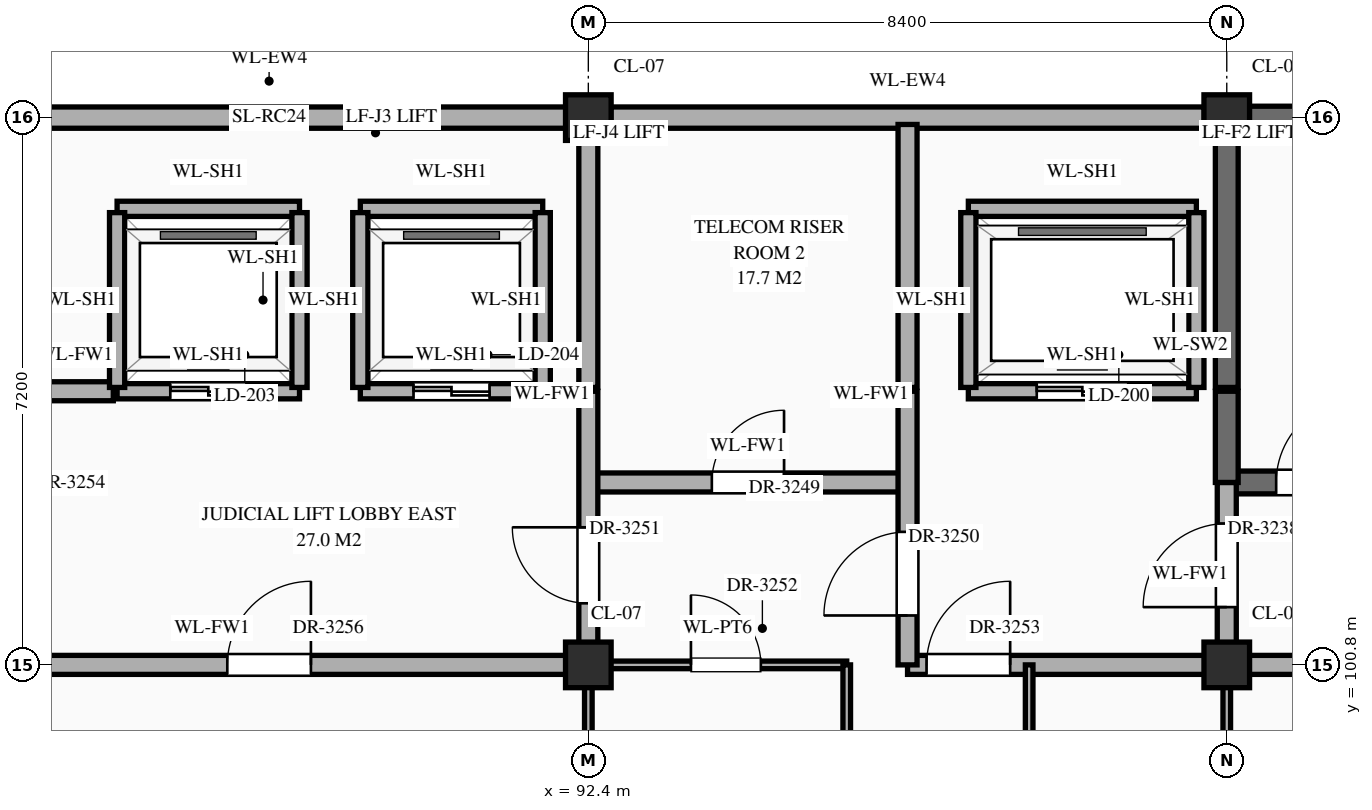
"""IFC4 building model, lengths in metres.
Left out: names, types, materials, properties, quantities, classifications, styles, units other than length and angle.
Written with IfcOpenShell. Run it as: python <this file> out.ifc"""

import sys

from ifc_helpers import new_model, si_unit, direction, frame, frame_2d, origin, origin_2d, place, context, subcontext, project, spatial, rectangle, extrude, element, fill, save


model = new_model("IFC4")
c1 = context("Model", 3, precision=1e-05, world=origin(), true_north=direction((0.0, 1.0)))
c2 = subcontext(c1, "Body", "Model", "MODEL_VIEW")
j1 = project(units=[si_unit("LENGTHUNIT", "METRE"), si_unit("PLANEANGLEUNIT", "RADIAN")], contexts=[c1])
p1 = place(None, origin())
s1 = spatial("IfcSite", under=j1, at=p1, CompositionType="ELEMENT")
p2 = place(p1, origin())
s2 = spatial("IfcBuilding", under=s1, at=p2, CompositionType="ELEMENT")
p3 = place(p2, frame((0.0, 0.0, 60.3)))
s3 = spatial("IfcBuildingStorey", under=s2, at=p3, CompositionType="ELEMENT", Elevation=60.3)
for number, where, z_axis, x_axis in (
    (1, (92.4, 100.8, 0.0), (0.0, 0.0, 1.0), (1.0, 0.0, 0.0)),
    (2, (92.4, 108.0, 0.0), (0.0, 0.0, 1.0), (1.0, 0.0, 0.0)),
    (3, (100.8, 100.8, 0.0), (0.0, 0.0, 1.0), (1.0, 0.0, 0.0)),
    (4, (100.8, 108.0, 0.0), (0.0, 0.0, 1.0), (1.0, 0.0, 0.0)),
):
    element("IfcColumn", number, at=place(p3, frame(where, z_axis=z_axis, x_axis=x_axis)), inside=s3, PredefinedType="COLUMN", context=c2, shape_type="SweptSolid", body=[
        extrude(rectangle(XDim=0.6, YDim=0.6, at=origin_2d()), origin(), (0.0, 0.0, 1.0), 4.2),
    ])
p4 = place(p3, frame((84.295, 108.0, 0.0), z_axis=(0.0, 0.0, 1.0), x_axis=(1.0, 0.0, 0.0)))
e5 = element("IfcWall", 5, at=p4, inside=s3, PredefinedType="STANDARD", context=c2, shape_type="SweptSolid", body=[
    extrude(rectangle(XDim=7.81, YDim=0.28, at=frame_2d((3.905, 0.0))), origin(), (0.0, 0.0, 1.0), 3.31),
])
p5 = place(p3, frame((92.695, 108.0, 0.0), z_axis=(0.0, 0.0, 1.0), x_axis=(1.0, 0.0, 0.0)))
e6 = element("IfcWall", 6, at=p5, inside=s3, PredefinedType="STANDARD", context=c2, shape_type="SweptSolid", body=[
    extrude(rectangle(XDim=7.81, YDim=0.28, at=frame_2d((3.905, 0.0))), origin(), (0.0, 0.0, 1.0), 3.31),
])
p6 = place(p3, frame((101.095, 108.0, 0.0), z_axis=(0.0, 0.0, 1.0), x_axis=(1.0, 0.0, 0.0)))
e7 = element("IfcWall", 7, at=p6, inside=s3, PredefinedType="SHEAR", context=c2, shape_type="SweptSolid", body=[
    extrude(rectangle(XDim=7.81, YDim=0.3, at=frame_2d((3.905, 0.0))), origin(), (0.0, 0.0, 1.0), 3.96),
])
p7 = place(p3, frame((75.6, 100.8, 0.0), z_axis=(0.0, 0.0, 1.0), x_axis=(1.0, 0.0, 0.0)))
e8 = element("IfcWall", 8, at=p7, inside=s3, PredefinedType="STANDARD", context=c2, shape_type="SweptSolid", body=[
    extrude(rectangle(XDim=16.8, YDim=0.25, at=frame_2d((8.4, 0.0))), origin(), (0.0, 0.0, 1.0), 3.11),
])
p8 = place(p7, frame((3.725, 0.0, 0.0)))
e9 = element("IfcOpeningElement", 9, at=p8, cuts=e8, PredefinedType="OPENING", context=c2, shape_type="SweptSolid", body=[
    extrude(rectangle(XDim=0.95, YDim=2.15, at=frame_2d((0.475, 1.075))), frame((0.0, 0.137, 0.0), z_axis=(0.0, -1.0, 0.0), x_axis=(1.0, 0.0, 0.0)), (0.0, 0.0, 1.0), 0.274),
])
p9 = place(p7, frame((12.05, 0.0, 0.0)))
e10 = element("IfcOpeningElement", 10, at=p9, cuts=e8, PredefinedType="OPENING", context=c2, shape_type="SweptSolid", body=[
    extrude(rectangle(XDim=1.1, YDim=2.2, at=frame_2d((0.55, 1.1))), frame((0.0, 0.137, 0.0), z_axis=(0.0, -1.0, 0.0), x_axis=(1.0, 0.0, 0.0)), (0.0, 0.0, 1.0), 0.274),
])
p10 = place(p3, frame((92.4, 100.8, 0.0), z_axis=(0.0, 0.0, 1.0), x_axis=(1.0, 0.0, 0.0)))
e11 = element("IfcWall", 11, at=p10, inside=s3, PredefinedType="STANDARD", context=c2, shape_type="SweptSolid", body=[
    extrude(rectangle(XDim=3.4, YDim=0.1, at=frame_2d((1.7, 0.0))), origin(), (0.0, 0.0, 1.0), 3.11),
])
p11 = place(p10, frame((1.35, 0.0, 0.0)))
e12 = element("IfcOpeningElement", 12, at=p11, cuts=e11, PredefinedType="OPENING", context=c2, shape_type="SweptSolid", body=[
    extrude(rectangle(XDim=0.92, YDim=2.15, at=frame_2d((0.46, 1.075))), frame((0.0, 0.062, 0.0), z_axis=(0.0, -1.0, 0.0), x_axis=(1.0, 0.0, 0.0)), (0.0, 0.0, 1.0), 0.124),
])
p12 = place(p3, frame((96.6, 100.8, 0.0), z_axis=(0.0, 0.0, 1.0), x_axis=(1.0, 0.0, 0.0)))
e13 = element("IfcWall", 13, at=p12, inside=s3, PredefinedType="STANDARD", context=c2, shape_type="SweptSolid", body=[
    extrude(rectangle(XDim=12.56, YDim=0.25, at=frame_2d((6.28, 0.0))), origin(), (0.0, 0.0, 1.0), 3.11),
])
p13 = place(p12, frame((7.9, 0.0, 0.0)))
e14 = element("IfcOpeningElement", 14, at=p13, cuts=e13, PredefinedType="OPENING", context=c2, shape_type="SweptSolid", body=[
    extrude(rectangle(XDim=1.0, YDim=2.2, at=frame_2d((0.5, 1.1))), frame((0.0, 0.137, 0.0), z_axis=(0.0, -1.0, 0.0), x_axis=(1.0, 0.0, 0.0)), (0.0, 0.0, 1.0), 0.274),
])
p14 = place(p12, frame((0.25, 0.0, 0.0)))
e15 = element("IfcOpeningElement", 15, at=p14, cuts=e13, PredefinedType="OPENING", context=c2, shape_type="SweptSolid", body=[
    extrude(rectangle(XDim=1.1, YDim=2.2, at=frame_2d((0.55, 1.1))), frame((0.0, 0.137, 0.0), z_axis=(0.0, -1.0, 0.0), x_axis=(1.0, 0.0, 0.0)), (0.0, 0.0, 1.0), 0.274),
])
p15 = place(p3, frame((92.4, 103.2, 0.0), z_axis=(0.0, 0.0, 1.0), x_axis=(1.0, 0.0, 0.0)))
e16 = element("IfcWall", 16, at=p15, inside=s3, PredefinedType="STANDARD", context=c2, shape_type="SweptSolid", body=[
    extrude(rectangle(XDim=4.2, YDim=0.25, at=frame_2d((2.1, 0.0))), origin(), (0.0, 0.0, 1.0), 3.96),
])
p16 = place(p15, frame((1.625, 0.0, 0.0)))
e17 = element("IfcOpeningElement", 17, at=p16, cuts=e16, PredefinedType="OPENING", context=c2, shape_type="SweptSolid", body=[
    extrude(rectangle(XDim=0.95, YDim=2.15, at=frame_2d((0.475, 1.075))), frame((0.0, 0.137, 0.0), z_axis=(0.0, -1.0, 0.0), x_axis=(1.0, 0.0, 0.0)), (0.0, 0.0, 1.0), 0.274),
])
p17 = place(p3, frame((100.8, 103.2, 0.0), z_axis=(0.0, 0.0, 1.0), x_axis=(1.0, 0.0, 0.0)))
e18 = element("IfcWall", 18, at=p17, inside=s3, PredefinedType="SHEAR", context=c2, shape_type="SweptSolid", body=[
    extrude(rectangle(XDim=8.36, YDim=0.3, at=frame_2d((4.18, 0.0))), origin(), (0.0, 0.0, 1.0), 3.96),
])
p18 = place(p17, frame((0.65, 0.0, 0.0)))
e19 = element("IfcOpeningElement", 19, at=p18, cuts=e18, PredefinedType="OPENING", context=c2, shape_type="SweptSolid", body=[
    extrude(rectangle(XDim=1.1, YDim=2.2, at=frame_2d((0.55, 1.1))), frame((0.0, 0.162, 0.0), z_axis=(0.0, -1.0, 0.0), x_axis=(1.0, 0.0, 0.0)), (0.0, 0.0, 1.0), 0.324),
])
p19 = place(p3, frame((84.05, 104.4, 0.0), z_axis=(0.0, 0.0, 1.0), x_axis=(1.0, 0.0, 0.0)))
e20 = element("IfcWall", 20, at=p19, inside=s3, PredefinedType="STANDARD", context=c2, shape_type="SweptSolid", body=[
    extrude(rectangle(XDim=2.1, YDim=0.25, at=frame_2d((1.05, 0.0))), origin(), (0.0, 0.0, 1.0), 3.96),
])
p20 = place(p3, frame((86.2, 104.4, 0.0), z_axis=(0.0, 0.0, 1.0), x_axis=(1.0, 0.0, 0.0)))
e21 = element("IfcWall", 21, at=p20, inside=s3, PredefinedType="STANDARD", context=c2, shape_type="SweptSolid", body=[
    extrude(rectangle(XDim=2.4, YDim=0.2, at=frame_2d((1.2, 0.0))), origin(), (0.0, 0.0, 1.0), 3.96),
])
p21 = place(p20, frame((0.7, 0.0, 0.0)))
e22 = element("IfcOpeningElement", 22, at=p21, cuts=e21, PredefinedType="OPENING", context=c2, shape_type="SweptSolid", body=[
    extrude(rectangle(XDim=1.0, YDim=2.15, at=frame_2d((0.5, 1.075))), frame((0.0, 0.112, 0.0), z_axis=(0.0, -1.0, 0.0), x_axis=(1.0, 0.0, 0.0)), (0.0, 0.0, 1.0), 0.224),
])
p22 = place(p3, frame((89.4, 104.4, 0.0), z_axis=(0.0, 0.0, 1.0), x_axis=(1.0, 0.0, 0.0)))
e23 = element("IfcWall", 23, at=p22, inside=s3, PredefinedType="STANDARD", context=c2, shape_type="SweptSolid", body=[
    extrude(rectangle(XDim=2.4, YDim=0.2, at=frame_2d((1.2, 0.0))), origin(), (0.0, 0.0, 1.0), 3.96),
])
p23 = place(p22, frame((0.7, 0.0, 0.0)))
e24 = element("IfcOpeningElement", 24, at=p23, cuts=e23, PredefinedType="OPENING", context=c2, shape_type="SweptSolid", body=[
    extrude(rectangle(XDim=1.0, YDim=2.15, at=frame_2d((0.5, 1.075))), frame((0.0, 0.112, 0.0), z_axis=(0.0, -1.0, 0.0), x_axis=(1.0, 0.0, 0.0)), (0.0, 0.0, 1.0), 0.224),
])
p24 = place(p3, frame((97.4, 104.4, 0.0), z_axis=(0.0, 0.0, 1.0), x_axis=(1.0, 0.0, 0.0)))
e25 = element("IfcWall", 25, at=p24, inside=s3, PredefinedType="STANDARD", context=c2, shape_type="SweptSolid", body=[
    extrude(rectangle(XDim=3.0, YDim=0.2, at=frame_2d((1.5, 0.0))), origin(), (0.0, 0.0, 1.0), 3.96),
])
p25 = place(p24, frame((0.9, 0.0, 0.0)))
e26 = element("IfcOpeningElement", 26, at=p25, cuts=e25, PredefinedType="OPENING", context=c2, shape_type="SweptSolid", body=[
    extrude(rectangle(XDim=1.2, YDim=2.15, at=frame_2d((0.6, 1.075))), frame((0.0, 0.112, 0.0), z_axis=(0.0, -1.0, 0.0), x_axis=(1.0, 0.0, 0.0)), (0.0, 0.0, 1.0), 0.224),
])
for number, where, z_axis, x_axis in (
    (27, (86.2, 106.8, 0.0), (0.0, 0.0, 1.0), (1.0, 0.0, 0.0)),
    (28, (89.4, 106.8, 0.0), (0.0, 0.0, 1.0), (1.0, 0.0, 0.0)),
):
    element("IfcWall", number, at=place(p3, frame(where, z_axis=z_axis, x_axis=x_axis)), inside=s3, PredefinedType="STANDARD", context=c2, shape_type="SweptSolid", body=[
        extrude(rectangle(XDim=2.4, YDim=0.2, at=frame_2d((1.2, 0.0))), origin(), (0.0, 0.0, 1.0), 3.96),
    ])
p26 = place(p3, frame((97.4, 106.8, 0.0), z_axis=(0.0, 0.0, 1.0), x_axis=(1.0, 0.0, 0.0)))
e29 = element("IfcWall", 29, at=p26, inside=s3, PredefinedType="STANDARD", context=c2, shape_type="SweptSolid", body=[
    extrude(rectangle(XDim=3.0, YDim=0.2, at=frame_2d((1.5, 0.0))), origin(), (0.0, 0.0, 1.0), 3.96),
])
for number, where, z_axis, x_axis in (
    (30, (86.2, 104.45, 0.0), (0.0, 0.0, 1.0), (0.0, 1.0, 0.0)),
    (31, (88.6, 104.45, 0.0), (0.0, 0.0, 1.0), (0.0, 1.0, 0.0)),
    (32, (89.4, 104.45, 0.0), (0.0, 0.0, 1.0), (0.0, 1.0, 0.0)),
    (33, (91.8, 104.45, 0.0), (0.0, 0.0, 1.0), (0.0, 1.0, 0.0)),
):
    element("IfcWall", number, at=place(p3, frame(where, z_axis=z_axis, x_axis=x_axis)), inside=s3, PredefinedType="STANDARD", context=c2, shape_type="SweptSolid", body=[
        extrude(rectangle(XDim=2.3, YDim=0.2, at=frame_2d((1.15, 0.0))), origin(), (0.0, 0.0, 1.0), 3.96),
    ])
p27 = place(p3, frame((92.4, 95.35, 0.0), z_axis=(0.0, 0.0, 1.0), x_axis=(0.0, 1.0, 0.0)))
e34 = element("IfcWall", 34, at=p27, inside=s3, PredefinedType="STANDARD", context=c2, shape_type="SweptSolid", body=[
    extrude(rectangle(XDim=5.45, YDim=0.1, at=frame_2d((2.725, 0.0))), origin(), (0.0, 0.0, 1.0), 3.21),
])
p28 = place(p3, frame((92.4, 100.8, 0.0), z_axis=(0.0, 0.0, 1.0), x_axis=(0.0, 1.0, 0.0)))
e35 = element("IfcWall", 35, at=p28, inside=s3, PredefinedType="STANDARD", context=c2, shape_type="SweptSolid", body=[
    extrude(rectangle(XDim=3.6, YDim=0.25, at=frame_2d((1.8, 0.0))), origin(), (0.0, 0.0, 1.0), 3.21),
])
p29 = place(p28, frame((0.81, 0.0, 0.0)))
e36 = element("IfcOpeningElement", 36, at=p29, cuts=e35, PredefinedType="OPENING", context=c2, shape_type="SweptSolid", body=[
    extrude(rectangle(XDim=1.0, YDim=2.2, at=frame_2d((0.5, 1.1))), frame((0.0, 0.137, 0.0), z_axis=(0.0, -1.0, 0.0), x_axis=(1.0, 0.0, 0.0)), (0.0, 0.0, 1.0), 0.274),
])
p30 = place(p3, frame((92.4, 104.45, 0.0), z_axis=(0.0, 0.0, 1.0), x_axis=(0.0, 1.0, 0.0)))
e37 = element("IfcWall", 37, at=p30, inside=s3, PredefinedType="STANDARD", context=c2, shape_type="SweptSolid", body=[
    extrude(rectangle(XDim=3.46, YDim=0.25, at=frame_2d((1.73, 0.0))), origin(), (0.0, 0.0, 1.0), 3.21),
])
p31 = place(p3, frame((95.8, 95.35, 0.0), z_axis=(0.0, 0.0, 1.0), x_axis=(0.0, 1.0, 0.0)))
e38 = element("IfcWall", 38, at=p31, inside=s3, PredefinedType="STANDARD", context=c2, shape_type="SweptSolid", body=[
    extrude(rectangle(XDim=5.45, YDim=0.1, at=frame_2d((2.725, 0.0))), origin(), (0.0, 0.0, 1.0), 3.96),
])
p32 = place(p31, frame((2.155, 0.0, 0.0)))
e39 = element("IfcOpeningElement", 39, at=p32, cuts=e38, PredefinedType="OPENING", context=c2, shape_type="SweptSolid", body=[
    extrude(rectangle(XDim=1.14, YDim=2.4, at=frame_2d((0.57, 1.2))), frame((0.0, 0.062, 0.0), z_axis=(0.0, -1.0, 0.0), x_axis=(1.0, 0.0, 0.0)), (0.0, 0.0, 1.0), 0.124),
])
p33 = place(p3, frame((96.6, 100.8, 0.0), z_axis=(0.0, 0.0, 1.0), x_axis=(0.0, 1.0, 0.0)))
e40 = element("IfcWall", 40, at=p33, inside=s3, PredefinedType="STANDARD", context=c2, shape_type="SweptSolid", body=[
    extrude(rectangle(XDim=3.6, YDim=0.25, at=frame_2d((1.8, 0.0))), origin(), (0.0, 0.0, 1.0), 3.96),
])
p34 = place(p33, frame((0.65, 0.0, 0.0)))
e41 = element("IfcOpeningElement", 41, at=p34, cuts=e40, PredefinedType="OPENING", context=c2, shape_type="SweptSolid", body=[
    extrude(rectangle(XDim=1.1, YDim=2.2, at=frame_2d((0.55, 1.1))), frame((0.0, 0.137, 0.0), z_axis=(0.0, -1.0, 0.0), x_axis=(1.0, 0.0, 0.0)), (0.0, 0.0, 1.0), 0.274),
])
p35 = place(p3, frame((96.6, 104.45, 0.0), z_axis=(0.0, 0.0, 1.0), x_axis=(0.0, 1.0, 0.0)))
e42 = element("IfcWall", 42, at=p35, inside=s3, PredefinedType="STANDARD", context=c2, shape_type="SweptSolid", body=[
    extrude(rectangle(XDim=3.46, YDim=0.25, at=frame_2d((1.73, 0.0))), origin(), (0.0, 0.0, 1.0), 3.96),
])
p36 = place(p3, frame((97.4, 104.45, 0.0), z_axis=(0.0, 0.0, 1.0), x_axis=(0.0, 1.0, 0.0)))
e43 = element("IfcWall", 43, at=p36, inside=s3, PredefinedType="STANDARD", context=c2, shape_type="SweptSolid", body=[
    extrude(rectangle(XDim=2.3, YDim=0.2, at=frame_2d((1.15, 0.0))), origin(), (0.0, 0.0, 1.0), 3.96),
])
p37 = place(p3, frame((98.2, 95.35, 0.0), z_axis=(0.0, 0.0, 1.0), x_axis=(0.0, 1.0, 0.0)))
e44 = element("IfcWall", 44, at=p37, inside=s3, PredefinedType="STANDARD", context=c2, shape_type="SweptSolid", body=[
    extrude(rectangle(XDim=5.45, YDim=0.1, at=frame_2d((2.725, 0.0))), origin(), (0.0, 0.0, 1.0), 3.96),
])
p38 = place(p37, frame((2.275, 0.0, 0.0)))
e45 = element("IfcOpeningElement", 45, at=p38, cuts=e44, PredefinedType="OPENING", context=c2, shape_type="SweptSolid", body=[
    extrude(rectangle(XDim=0.9, YDim=2.15, at=frame_2d((0.45, 1.075))), frame((0.0, 0.062, 0.0), z_axis=(0.0, -1.0, 0.0), x_axis=(1.0, 0.0, 0.0)), (0.0, 0.0, 1.0), 0.124),
])
p39 = place(p3, frame((100.4, 104.45, 0.0), z_axis=(0.0, 0.0, 1.0), x_axis=(0.0, 1.0, 0.0)))
e46 = element("IfcWall", 46, at=p39, inside=s3, PredefinedType="STANDARD", context=c2, shape_type="SweptSolid", body=[
    extrude(rectangle(XDim=2.3, YDim=0.2, at=frame_2d((1.15, 0.0))), origin(), (0.0, 0.0, 1.0), 3.96),
])
p40 = place(p3, frame((100.8, 95.35, 0.0), z_axis=(0.0, 0.0, 1.0), x_axis=(0.0, 1.0, 0.0)))
e47 = element("IfcWall", 47, at=p40, inside=s3, PredefinedType="STANDARD", context=c2, shape_type="SweptSolid", body=[
    extrude(rectangle(XDim=5.45, YDim=0.1, at=frame_2d((2.725, 0.0))), origin(), (0.0, 0.0, 1.0), 3.21),
])
p41 = place(p3, frame((100.8, 100.8, 0.0), z_axis=(0.0, 0.0, 1.0), x_axis=(0.0, 1.0, 0.0)))
e48 = element("IfcWall", 48, at=p41, inside=s3, PredefinedType="STANDARD", context=c2, shape_type="SweptSolid", body=[
    extrude(rectangle(XDim=2.4, YDim=0.25, at=frame_2d((1.2, 0.0))), origin(), (0.0, 0.0, 1.0), 3.21),
])
p42 = place(p41, frame((0.76, 0.0, 0.0)))
e49 = element("IfcOpeningElement", 49, at=p42, cuts=e48, PredefinedType="OPENING", context=c2, shape_type="SweptSolid", body=[
    extrude(rectangle(XDim=1.1, YDim=2.2, at=frame_2d((0.55, 1.1))), frame((0.0, 0.137, 0.0), z_axis=(0.0, -1.0, 0.0), x_axis=(1.0, 0.0, 0.0)), (0.0, 0.0, 1.0), 0.274),
])
p43 = place(p3, frame((100.8, 103.2, 0.0), z_axis=(0.0, 0.0, 1.0), x_axis=(0.0, 1.0, 0.0)))
e50 = element("IfcWall", 50, at=p43, inside=s3, PredefinedType="SHEAR", context=c2, shape_type="SweptSolid", body=[
    extrude(rectangle(XDim=1.2, YDim=0.3, at=frame_2d((0.6, 0.0))), origin(), (0.0, 0.0, 1.0), 3.96),
])
p44 = place(p3, frame((100.8, 104.45, 0.0), z_axis=(0.0, 0.0, 1.0), x_axis=(0.0, 1.0, 0.0)))
e51 = element("IfcWall", 51, at=p44, inside=s3, PredefinedType="SHEAR", context=c2, shape_type="SweptSolid", body=[
    extrude(rectangle(XDim=3.46, YDim=0.3, at=frame_2d((1.73, 0.0))), origin(), (0.0, 0.0, 1.0), 3.96),
])
p45 = place(p25, origin())
e52 = element("IfcDoor", 52, at=p45, inside=s3, OperationType="DOUBLE_DOOR_SLIDING", PredefinedType="DOOR", context=c2, shape_type="SweptSolid", body=[
    extrude(rectangle(XDim=1.2, YDim=2.15, at=frame_2d((0.6, 1.075))), frame((0.0, 0.025, 0.0), z_axis=(0.0, -1.0, 0.0), x_axis=(1.0, 0.0, 0.0)), (0.0, 0.0, 1.0), 0.05),
])
fill(e26, e52)
p46 = place(p21, origin())
e53 = element("IfcDoor", 53, at=p46, inside=s3, OperationType="DOUBLE_DOOR_SLIDING", PredefinedType="DOOR", context=c2, shape_type="SweptSolid", body=[
    extrude(rectangle(XDim=1.0, YDim=2.15, at=frame_2d((0.5, 1.075))), frame((0.0, 0.025, 0.0), z_axis=(0.0, -1.0, 0.0), x_axis=(1.0, 0.0, 0.0)), (0.0, 0.0, 1.0), 0.05),
])
fill(e22, e53)
p47 = place(p23, origin())
e54 = element("IfcDoor", 54, at=p47, inside=s3, OperationType="DOUBLE_DOOR_SLIDING", PredefinedType="DOOR", context=c2, shape_type="SweptSolid", body=[
    extrude(rectangle(XDim=1.0, YDim=2.15, at=frame_2d((0.5, 1.075))), frame((0.0, 0.025, 0.0), z_axis=(0.0, -1.0, 0.0), x_axis=(1.0, 0.0, 0.0)), (0.0, 0.0, 1.0), 0.05),
])
fill(e24, e54)
p48 = place(p18, origin())
e55 = element("IfcDoor", 55, at=p48, inside=s3, OperationType="SINGLE_SWING_RIGHT", PredefinedType="DOOR", context=c2, shape_type="SweptSolid", body=[
    extrude(rectangle(XDim=1.1, YDim=2.2, at=frame_2d((0.55, 1.1))), frame((0.0, 0.025, 0.0), z_axis=(0.0, -1.0, 0.0), x_axis=(1.0, 0.0, 0.0)), (0.0, 0.0, 1.0), 0.05),
])
fill(e19, e55)
p49 = place(p42, origin())
e56 = element("IfcDoor", 56, at=p49, inside=s3, OperationType="SINGLE_SWING_LEFT", PredefinedType="DOOR", context=c2, shape_type="SweptSolid", body=[
    extrude(rectangle(XDim=1.1, YDim=2.2, at=frame_2d((0.55, 1.1))), frame((0.0, 0.025, 0.0), z_axis=(0.0, -1.0, 0.0), x_axis=(1.0, 0.0, 0.0)), (0.0, 0.0, 1.0), 0.05),
])
fill(e49, e56)
p50 = place(p16, origin())
e57 = element("IfcDoor", 57, at=p50, inside=s3, OperationType="SINGLE_SWING_RIGHT", PredefinedType="DOOR", context=c2, shape_type="SweptSolid", body=[
    extrude(rectangle(XDim=0.95, YDim=2.15, at=frame_2d((0.475, 1.075))), frame((0.0, 0.025, 0.0), z_axis=(0.0, -1.0, 0.0), x_axis=(1.0, 0.0, 0.0)), (0.0, 0.0, 1.0), 0.05),
])
fill(e17, e57)
p51 = place(p34, origin())
e58 = element("IfcDoor", 58, at=p51, inside=s3, OperationType="SINGLE_SWING_LEFT", PredefinedType="DOOR", context=c2, shape_type="SweptSolid", body=[
    extrude(rectangle(XDim=1.1, YDim=2.2, at=frame_2d((0.55, 1.1))), frame((0.0, 0.025, 0.0), z_axis=(0.0, -1.0, 0.0), x_axis=(1.0, 0.0, 0.0)), (0.0, 0.0, 1.0), 0.05),
])
fill(e41, e58)
p52 = place(p29, origin())
e59 = element("IfcDoor", 59, at=p52, inside=s3, OperationType="SINGLE_SWING_RIGHT", PredefinedType="DOOR", context=c2, shape_type="SweptSolid", body=[
    extrude(rectangle(XDim=1.0, YDim=2.2, at=frame_2d((0.5, 1.1))), frame((0.0, 0.025, 0.0), z_axis=(0.0, -1.0, 0.0), x_axis=(1.0, 0.0, 0.0)), (0.0, 0.0, 1.0), 0.05),
])
fill(e36, e59)
p53 = place(p11, origin())
e60 = element("IfcDoor", 60, at=p53, inside=s3, OperationType="SINGLE_SWING_LEFT", PredefinedType="DOOR", context=c2, shape_type="SweptSolid", body=[
    extrude(rectangle(XDim=0.92, YDim=2.15, at=frame_2d((0.46, 1.075))), frame((0.0, 0.025, 0.0), z_axis=(0.0, -1.0, 0.0), x_axis=(1.0, 0.0, 0.0)), (0.0, 0.0, 1.0), 0.05),
])
fill(e12, e60)
p54 = place(p14, origin())
e61 = element("IfcDoor", 61, at=p54, inside=s3, OperationType="SINGLE_SWING_RIGHT", PredefinedType="DOOR", context=c2, shape_type="SweptSolid", body=[
    extrude(rectangle(XDim=1.1, YDim=2.2, at=frame_2d((0.55, 1.1))), frame((0.0, 0.025, 0.0), z_axis=(0.0, -1.0, 0.0), x_axis=(1.0, 0.0, 0.0)), (0.0, 0.0, 1.0), 0.05),
])
fill(e15, e61)
p55 = place(p9, origin())
e62 = element("IfcDoor", 62, at=p55, inside=s3, OperationType="SINGLE_SWING_RIGHT", PredefinedType="DOOR", context=c2, shape_type="SweptSolid", body=[
    extrude(rectangle(XDim=1.1, YDim=2.2, at=frame_2d((0.55, 1.1))), frame((0.0, 0.025, 0.0), z_axis=(0.0, -1.0, 0.0), x_axis=(1.0, 0.0, 0.0)), (0.0, 0.0, 1.0), 0.05),
])
fill(e10, e62)
save(model, sys.argv[1])
